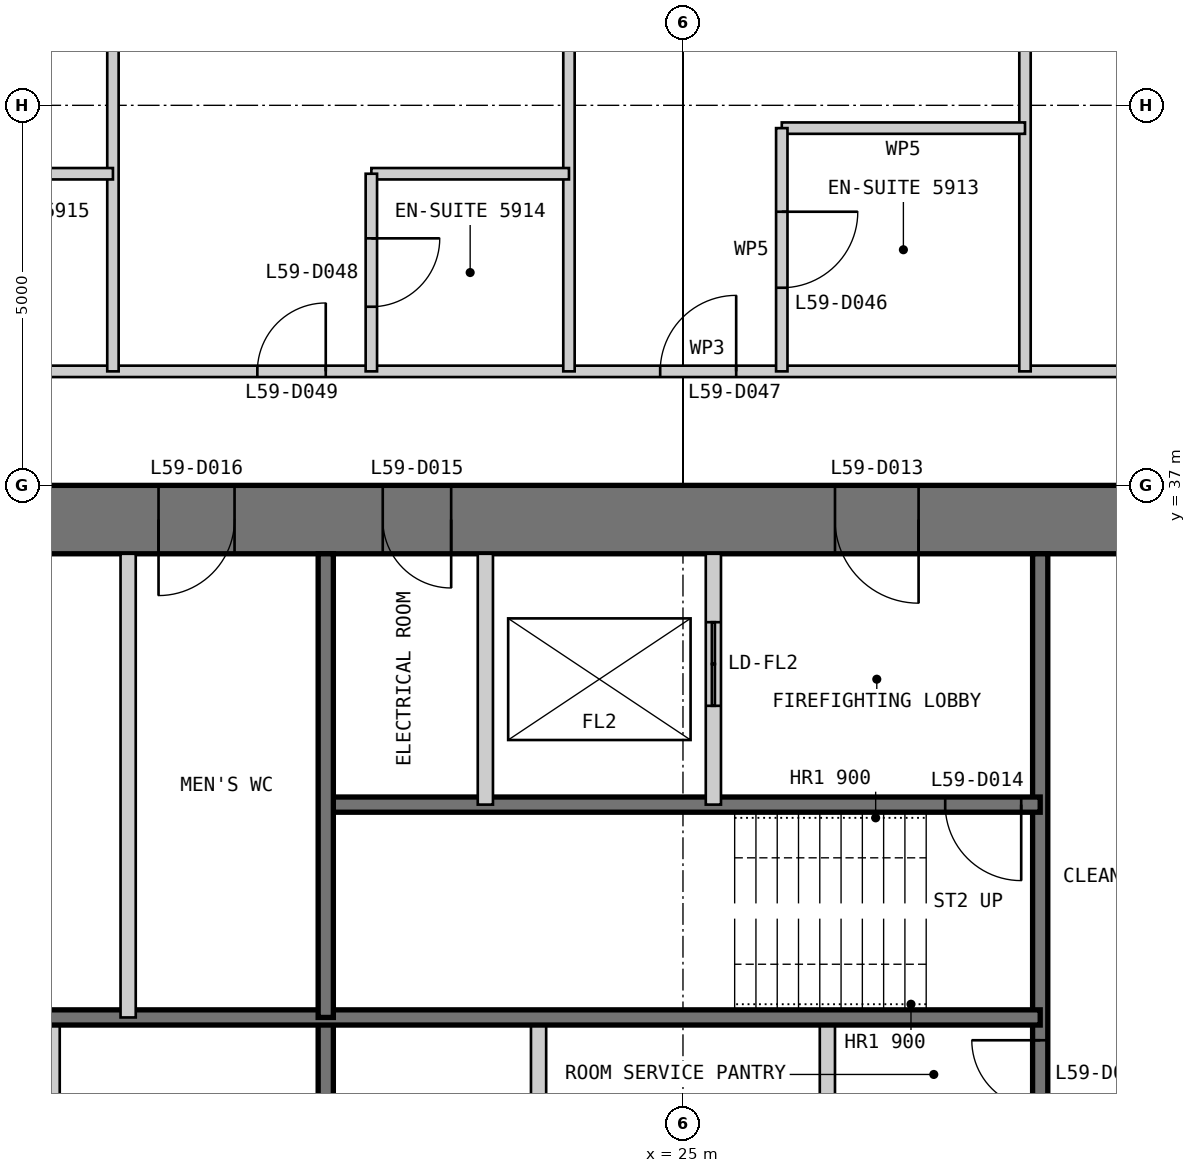
"""IFC4 building model, lengths in metres.
Left out: names, types, materials, properties, quantities, classifications, styles, units other than length and angle.
Written with IfcOpenShell. Run it as: python <this file> out.ifc"""

import sys

from ifc_helpers import new_model, si_unit, direction, frame, frame_2d, origin, place, context, subcontext, project, spatial, polyline, rectangle, outline, extrude, element, fill, save


model = new_model("IFC4")
c1 = context("Model", 3, precision=1e-05, world=origin(), true_north=direction((0.0, 1.0)))
c2 = subcontext(c1, "Body", "Model", "MODEL_VIEW")
j1 = project(units=[si_unit("LENGTHUNIT", "METRE"), si_unit("PLANEANGLEUNIT", "RADIAN")], contexts=[c1])
p1 = place(None, origin())
s1 = spatial("IfcSite", under=j1, at=p1, CompositionType="ELEMENT")
p2 = place(p1, origin())
s2 = spatial("IfcBuilding", under=s1, at=p2, CompositionType="ELEMENT")
p3 = place(p2, frame((0.0, 0.0, 252.6)))
s3 = spatial("IfcBuildingStorey", under=s2, at=p3, CompositionType="ELEMENT", Elevation=252.6)
p4 = place(p3, frame((37.0, 36.55, 0.0), z_axis=(0.0, 0.0, 1.0), x_axis=(-1.0, 0.0, 0.0)))
e1 = element("IfcWall", 1, at=p4, inside=s3, PredefinedType="SHEAR", context=c2, shape_type="SweptSolid", body=[
    extrude(outline(polyline([(0.0, -0.45), (24.0, -0.45), (23.1, 0.45), (0.9, 0.45), (0.0, -0.45)])), origin(), (0.0, 0.0, 1.0), 3.4),
])
p5 = place(p4, frame((4.9, 0.0, 0.0)))
e2 = element("IfcOpeningElement", 2, at=p5, cuts=e1, PredefinedType="OPENING", context=c2, shape_type="SweptSolid", body=[
    extrude(rectangle(XDim=1.0, YDim=2.2, at=frame_2d((0.5, 1.1))), frame((0.0, 0.46, 0.0), z_axis=(0.0, -1.0, 0.0), x_axis=(1.0, 0.0, 0.0)), (0.0, 0.0, 1.0), 0.92),
])
p6 = place(p4, frame((8.9, 0.0, 0.0)))
e3 = element("IfcOpeningElement", 3, at=p6, cuts=e1, PredefinedType="OPENING", context=c2, shape_type="SweptSolid", body=[
    extrude(rectangle(XDim=1.1, YDim=2.2, at=frame_2d((0.55, 1.1))), frame((0.0, 0.46, 0.0), z_axis=(0.0, -1.0, 0.0), x_axis=(1.0, 0.0, 0.0)), (0.0, 0.0, 1.0), 0.92),
])
p7 = place(p4, frame((15.05, 0.0, 0.0)))
e4 = element("IfcOpeningElement", 4, at=p7, cuts=e1, PredefinedType="OPENING", context=c2, shape_type="SweptSolid", body=[
    extrude(rectangle(XDim=0.9, YDim=2.2, at=frame_2d((0.45, 1.1))), frame((0.0, 0.46, 0.0), z_axis=(0.0, -1.0, 0.0), x_axis=(1.0, 0.0, 0.0)), (0.0, 0.0, 1.0), 0.92),
])
p8 = place(p4, frame((17.9, 0.0, 0.0)))
e5 = element("IfcOpeningElement", 5, at=p8, cuts=e1, PredefinedType="OPENING", context=c2, shape_type="SweptSolid", body=[
    extrude(rectangle(XDim=1.0, YDim=2.2, at=frame_2d((0.5, 1.1))), frame((0.0, 0.46, 0.0), z_axis=(0.0, -1.0, 0.0), x_axis=(1.0, 0.0, 0.0)), (0.0, 0.0, 1.0), 0.92),
])
p9 = place(p4, frame((21.4, 0.0, 0.0)))
e6 = element("IfcOpeningElement", 6, at=p9, cuts=e1, PredefinedType="OPENING", context=c2, shape_type="SweptSolid", body=[
    extrude(rectangle(XDim=1.0, YDim=2.2, at=frame_2d((0.5, 1.1))), frame((0.0, 0.46, 0.0), z_axis=(0.0, -1.0, 0.0), x_axis=(1.0, 0.0, 0.0)), (0.0, 0.0, 1.0), 0.92),
])
p10 = place(p3, frame((16.7, 13.9, 0.0), z_axis=(0.0, 0.0, 1.0), x_axis=(0.0, 1.0, 0.0)))
e7 = element("IfcWall", 7, at=p10, inside=s3, PredefinedType="PARTITIONING", context=c2, shape_type="SweptSolid", body=[
    extrude(rectangle(XDim=16.1, YDim=0.2, at=frame_2d((8.05, 0.0))), origin(), (0.0, 0.0, 1.0), 3.2),
])
p11 = place(p10, frame((13.4, 0.0, 0.0)))
e8 = element("IfcOpeningElement", 8, at=p11, cuts=e7, PredefinedType="OPENING", context=c2, shape_type="SweptSolid", body=[
    extrude(rectangle(XDim=0.9, YDim=2.2, at=frame_2d((0.45, 1.1))), frame((0.0, 0.11, 0.0), z_axis=(0.0, -1.0, 0.0), x_axis=(1.0, 0.0, 0.0)), (0.0, 0.0, 1.0), 0.22),
])
p12 = place(p3, frame((20.3, 13.9, 0.0), z_axis=(0.0, 0.0, 1.0), x_axis=(0.0, 1.0, 0.0)))
e9 = element("IfcWall", 9, at=p12, inside=s3, PredefinedType="SOLIDWALL", context=c2, shape_type="SweptSolid", body=[
    extrude(rectangle(XDim=16.1, YDim=0.2, at=frame_2d((8.05, 0.0))), origin(), (0.0, 0.0, 1.0), 3.2),
])
p13 = place(p12, frame((8.4, 0.0, 0.0)))
e10 = element("IfcOpeningElement", 10, at=p13, cuts=e9, PredefinedType="OPENING", context=c2, shape_type="SweptSolid", body=[
    extrude(rectangle(XDim=0.9, YDim=2.2, at=frame_2d((0.45, 1.1))), frame((0.0, 0.11, 0.0), z_axis=(0.0, -1.0, 0.0), x_axis=(1.0, 0.0, 0.0)), (0.0, 0.0, 1.0), 0.22),
])
p14 = place(p12, frame((13.4, 0.0, 0.0)))
e11 = element("IfcOpeningElement", 11, at=p14, cuts=e9, PredefinedType="OPENING", context=c2, shape_type="SweptSolid", body=[
    extrude(rectangle(XDim=0.9, YDim=2.2, at=frame_2d((0.45, 1.1))), frame((0.0, 0.11, 0.0), z_axis=(0.0, -1.0, 0.0), x_axis=(1.0, 0.0, 0.0)), (0.0, 0.0, 1.0), 0.22),
])
p15 = place(p3, frame((23.1, 20.0, 0.0), z_axis=(0.0, 0.0, 1.0), x_axis=(0.0, 1.0, 0.0)))
e12 = element("IfcWall", 12, at=p15, inside=s3, PredefinedType="PARTITIONING", context=c2, shape_type="SweptSolid", body=[
    extrude(rectangle(XDim=10.0, YDim=0.2, at=frame_2d((5.0, 0.0))), origin(), (0.0, 0.0, 1.0), 3.2),
])
p16 = place(p3, frame((29.7, 36.1, 0.0), z_axis=(0.0, 0.0, 1.0), x_axis=(0.0, -1.0, 0.0)))
e13 = element("IfcWall", 13, at=p16, inside=s3, PredefinedType="SOLIDWALL", context=c2, shape_type="SweptSolid", body=[
    extrude(rectangle(XDim=16.1, YDim=0.2, at=frame_2d((8.05, 0.0))), origin(), (0.0, 0.0, 1.0), 3.2),
])
p17 = place(p16, frame((6.4, 0.0, 0.0)))
e14 = element("IfcOpeningElement", 14, at=p17, cuts=e13, PredefinedType="OPENING", context=c2, shape_type="SweptSolid", body=[
    extrude(rectangle(XDim=0.9, YDim=2.2, at=frame_2d((0.45, 1.1))), frame((0.0, 0.11, 0.0), z_axis=(0.0, -1.0, 0.0), x_axis=(1.0, 0.0, 0.0)), (0.0, 0.0, 1.0), 0.22),
])
p18 = place(p16, frame((11.4, 0.0, 0.0)))
e15 = element("IfcOpeningElement", 15, at=p18, cuts=e13, PredefinedType="OPENING", context=c2, shape_type="SweptSolid", body=[
    extrude(rectangle(XDim=0.9, YDim=2.2, at=frame_2d((0.45, 1.1))), frame((0.0, 0.11, 0.0), z_axis=(0.0, -1.0, 0.0), x_axis=(1.0, 0.0, 0.0)), (0.0, 0.0, 1.0), 0.22),
])
p19 = place(p3, frame((26.9, 30.0, 0.0), z_axis=(0.0, 0.0, 1.0), x_axis=(0.0, -1.0, 0.0)))
e16 = element("IfcWall", 16, at=p19, inside=s3, PredefinedType="PARTITIONING", context=c2, shape_type="SweptSolid", body=[
    extrude(rectangle(XDim=10.0, YDim=0.2, at=frame_2d((5.0, 0.0))), origin(), (0.0, 0.0, 1.0), 3.2),
])
p20 = place(p3, frame((29.7, 32.8, 0.0), z_axis=(0.0, 0.0, 1.0), x_axis=(-1.0, 0.0, 0.0)))
e17 = element("IfcWall", 17, at=p20, inside=s3, PredefinedType="SOLIDWALL", context=c2, shape_type="SweptSolid", body=[
    extrude(rectangle(XDim=9.4, YDim=0.2, at=frame_2d((4.7, 0.0))), origin(), (0.0, 0.0, 1.0), 3.2),
])
p21 = place(p20, frame((0.25, 0.0, 0.0)))
e18 = element("IfcOpeningElement", 18, at=p21, cuts=e17, PredefinedType="OPENING", context=c2, shape_type="SweptSolid", body=[
    extrude(rectangle(XDim=1.0, YDim=2.2, at=frame_2d((0.5, 1.1))), frame((0.0, 0.11, 0.0), z_axis=(0.0, -1.0, 0.0), x_axis=(1.0, 0.0, 0.0)), (0.0, 0.0, 1.0), 0.22),
])
p22 = place(p3, frame((29.7, 30.0, 0.0), z_axis=(0.0, 0.0, 1.0), x_axis=(-1.0, 0.0, 0.0)))
e19 = element("IfcWall", 19, at=p22, inside=s3, PredefinedType="SOLIDWALL", context=c2, shape_type="SweptSolid", body=[
    extrude(rectangle(XDim=15.8, YDim=0.2, at=frame_2d((7.9, 0.0))), origin(), (0.0, 0.0, 1.0), 3.2),
])
p23 = place(p3, frame((25.4, 36.1, 0.0), z_axis=(0.0, 0.0, 1.0), x_axis=(0.0, -1.0, 0.0)))
e20 = element("IfcWall", 20, at=p23, inside=s3, PredefinedType="PARTITIONING", context=c2, shape_type="SweptSolid", body=[
    extrude(rectangle(XDim=3.3, YDim=0.2, at=frame_2d((1.65, 0.0))), origin(), (0.0, 0.0, 1.0), 3.2),
])
p24 = place(p23, frame((0.9, 0.0, 0.0)))
e21 = element("IfcOpeningElement", 21, at=p24, cuts=e20, PredefinedType="OPENING", context=c2, shape_type="SweptSolid", body=[
    extrude(rectangle(XDim=1.1, YDim=2.2, at=frame_2d((0.55, 1.1))), frame((0.0, 0.11, 0.0), z_axis=(0.0, -1.0, 0.0), x_axis=(1.0, 0.0, 0.0)), (0.0, 0.0, 1.0), 0.22),
])
p25 = place(p3, frame((22.4, 36.1, 0.0), z_axis=(0.0, 0.0, 1.0), x_axis=(0.0, -1.0, 0.0)))
e22 = element("IfcWall", 22, at=p25, inside=s3, PredefinedType="PARTITIONING", context=c2, shape_type="SweptSolid", body=[
    extrude(rectangle(XDim=3.3, YDim=0.2, at=frame_2d((1.65, 0.0))), origin(), (0.0, 0.0, 1.0), 3.2),
])
p26 = place(p3, frame((20.3, 36.1, 0.0), z_axis=(0.0, 0.0, 1.0), x_axis=(0.0, -1.0, 0.0)))
e23 = element("IfcWall", 23, at=p26, inside=s3, PredefinedType="SOLIDWALL", context=c2, shape_type="SweptSolid", body=[
    extrude(rectangle(XDim=6.1, YDim=0.2, at=frame_2d((3.05, 0.0))), origin(), (0.0, 0.0, 1.0), 3.2),
])
p27 = place(p3, frame((17.7, 36.1, 0.0), z_axis=(0.0, 0.0, 1.0), x_axis=(0.0, -1.0, 0.0)))
e24 = element("IfcWall", 24, at=p27, inside=s3, PredefinedType="PARTITIONING", context=c2, shape_type="SweptSolid", body=[
    extrude(rectangle(XDim=6.1, YDim=0.2, at=frame_2d((3.05, 0.0))), origin(), (0.0, 0.0, 1.0), 3.2),
])
p28 = place(p3, frame((38.5, 38.5, 0.0), z_axis=(0.0, 0.0, 1.0), x_axis=(-1.0, 0.0, 0.0)))
e25 = element("IfcWall", 25, at=p28, inside=s3, PredefinedType="PARTITIONING", context=c2, shape_type="SweptSolid", body=[
    extrude(rectangle(XDim=27.0, YDim=0.15, at=frame_2d((13.5, 0.0))), origin(), (0.0, 0.0, 1.0), 3.25),
])
p29 = place(p28, frame((1.85, 0.0, 0.0)))
e26 = element("IfcOpeningElement", 26, at=p29, cuts=e25, PredefinedType="OPENING", context=c2, shape_type="SweptSolid", body=[
    extrude(rectangle(XDim=0.9, YDim=2.1, at=frame_2d((0.45, 1.05))), frame((0.0, 0.085, 0.0), z_axis=(0.0, -1.0, 0.0), x_axis=(1.0, 0.0, 0.0)), (0.0, 0.0, 1.0), 0.17),
])
p30 = place(p28, frame((6.2, 0.0, 0.0)))
e27 = element("IfcOpeningElement", 27, at=p30, cuts=e25, PredefinedType="OPENING", context=c2, shape_type="SweptSolid", body=[
    extrude(rectangle(XDim=0.9, YDim=2.1, at=frame_2d((0.45, 1.05))), frame((0.0, 0.085, 0.0), z_axis=(0.0, -1.0, 0.0), x_axis=(1.0, 0.0, 0.0)), (0.0, 0.0, 1.0), 0.17),
])
p31 = place(p28, frame((12.8, 0.0, 0.0)))
e28 = element("IfcOpeningElement", 28, at=p31, cuts=e25, PredefinedType="OPENING", context=c2, shape_type="SweptSolid", body=[
    extrude(rectangle(XDim=1.0, YDim=2.1, at=frame_2d((0.5, 1.05))), frame((0.0, 0.085, 0.0), z_axis=(0.0, -1.0, 0.0), x_axis=(1.0, 0.0, 0.0)), (0.0, 0.0, 1.0), 0.17),
])
p32 = place(p28, frame((18.2, 0.0, 0.0)))
e29 = element("IfcOpeningElement", 29, at=p32, cuts=e25, PredefinedType="OPENING", context=c2, shape_type="SweptSolid", body=[
    extrude(rectangle(XDim=0.9, YDim=2.1, at=frame_2d((0.45, 1.05))), frame((0.0, 0.085, 0.0), z_axis=(0.0, -1.0, 0.0), x_axis=(1.0, 0.0, 0.0)), (0.0, 0.0, 1.0), 0.17),
])
p33 = place(p28, frame((24.2, 0.0, 0.0)))
e30 = element("IfcOpeningElement", 30, at=p33, cuts=e25, PredefinedType="OPENING", context=c2, shape_type="SweptSolid", body=[
    extrude(rectangle(XDim=0.9, YDim=2.1, at=frame_2d((0.45, 1.05))), frame((0.0, 0.085, 0.0), z_axis=(0.0, -1.0, 0.0), x_axis=(1.0, 0.0, 0.0)), (0.0, 0.0, 1.0), 0.17),
])
p34 = place(p3, frame((29.5, 49.85, 0.0), z_axis=(0.0, 0.0, 1.0), x_axis=(0.0, -1.0, 0.0)))
e31 = element("IfcWall", 31, at=p34, inside=s3, PredefinedType="PARTITIONING", context=c2, shape_type="SweptSolid", body=[
    extrude(rectangle(XDim=11.35, YDim=0.15, at=frame_2d((5.675, 0.0))), origin(), (0.0, 0.0, 1.0), 3.25),
])
p35 = place(p3, frame((29.5, 41.7, 0.0), z_axis=(0.0, 0.0, 1.0), x_axis=(-1.0, 0.0, 0.0)))
e32 = element("IfcWall", 32, at=p35, inside=s3, PredefinedType="PARTITIONING", context=c2, shape_type="SweptSolid", body=[
    extrude(rectangle(XDim=3.2, YDim=0.15, at=frame_2d((1.6, 0.0))), origin(), (0.0, 0.0, 1.0), 3.25),
])
p36 = place(p3, frame((26.3, 41.7, 0.0), z_axis=(0.0, 0.0, 1.0), x_axis=(0.0, -1.0, 0.0)))
e33 = element("IfcWall", 33, at=p36, inside=s3, PredefinedType="PARTITIONING", context=c2, shape_type="SweptSolid", body=[
    extrude(rectangle(XDim=3.2, YDim=0.15, at=frame_2d((1.6, 0.0))), origin(), (0.0, 0.0, 1.0), 3.25),
])
p37 = place(p36, frame((1.1, 0.0, 0.0)))
e34 = element("IfcOpeningElement", 34, at=p37, cuts=e33, PredefinedType="OPENING", context=c2, shape_type="SweptSolid", body=[
    extrude(rectangle(XDim=1.0, YDim=2.1, at=frame_2d((0.5, 1.05))), frame((0.0, 0.085, 0.0), z_axis=(0.0, -1.0, 0.0), x_axis=(1.0, 0.0, 0.0)), (0.0, 0.0, 1.0), 0.17),
])
p38 = place(p3, frame((23.5, 49.85, 0.0), z_axis=(0.0, 0.0, 1.0), x_axis=(0.0, -1.0, 0.0)))
e35 = element("IfcWall", 35, at=p38, inside=s3, PredefinedType="PARTITIONING", context=c2, shape_type="SweptSolid", body=[
    extrude(rectangle(XDim=11.35, YDim=0.15, at=frame_2d((5.675, 0.0))), origin(), (0.0, 0.0, 1.0), 3.25),
])
p39 = place(p3, frame((23.5, 41.1, 0.0), z_axis=(0.0, 0.0, 1.0), x_axis=(-1.0, 0.0, 0.0)))
e36 = element("IfcWall", 36, at=p39, inside=s3, PredefinedType="PARTITIONING", context=c2, shape_type="SweptSolid", body=[
    extrude(rectangle(XDim=2.6, YDim=0.15, at=frame_2d((1.3, 0.0))), origin(), (0.0, 0.0, 1.0), 3.25),
])
p40 = place(p3, frame((20.9, 41.1, 0.0), z_axis=(0.0, 0.0, 1.0), x_axis=(0.0, -1.0, 0.0)))
e37 = element("IfcWall", 37, at=p40, inside=s3, PredefinedType="PARTITIONING", context=c2, shape_type="SweptSolid", body=[
    extrude(rectangle(XDim=2.6, YDim=0.15, at=frame_2d((1.3, 0.0))), origin(), (0.0, 0.0, 1.0), 3.25),
])
p41 = place(p40, frame((0.85, 0.0, 0.0)))
e38 = element("IfcOpeningElement", 38, at=p41, cuts=e37, PredefinedType="OPENING", context=c2, shape_type="SweptSolid", body=[
    extrude(rectangle(XDim=0.9, YDim=2.1, at=frame_2d((0.45, 1.05))), frame((0.0, 0.085, 0.0), z_axis=(0.0, -1.0, 0.0), x_axis=(1.0, 0.0, 0.0)), (0.0, 0.0, 1.0), 0.17),
])
p42 = place(p3, frame((17.5, 49.85, 0.0), z_axis=(0.0, 0.0, 1.0), x_axis=(0.0, -1.0, 0.0)))
e39 = element("IfcWall", 39, at=p42, inside=s3, PredefinedType="PARTITIONING", context=c2, shape_type="SweptSolid", body=[
    extrude(rectangle(XDim=11.35, YDim=0.15, at=frame_2d((5.675, 0.0))), origin(), (0.0, 0.0, 1.0), 3.25),
])
p43 = place(p3, frame((17.5, 41.1, 0.0), z_axis=(0.0, 0.0, 1.0), x_axis=(-1.0, 0.0, 0.0)))
e40 = element("IfcWall", 40, at=p43, inside=s3, PredefinedType="PARTITIONING", context=c2, shape_type="SweptSolid", body=[
    extrude(rectangle(XDim=2.6, YDim=0.15, at=frame_2d((1.3, 0.0))), origin(), (0.0, 0.0, 1.0), 3.25),
])
p44 = place(p6, origin())
e41 = element("IfcDoor", 41, at=p44, inside=s3, OperationType="SINGLE_SWING_LEFT", PredefinedType="DOOR", context=c2, shape_type="SweptSolid", body=[
    extrude(rectangle(XDim=1.1, YDim=2.2, at=frame_2d((0.55, 1.1))), frame((0.0, 0.025, 0.0), z_axis=(0.0, -1.0, 0.0), x_axis=(1.0, 0.0, 0.0)), (0.0, 0.0, 1.0), 0.05),
    extrude(outline(polyline([(0.0, 0.0), (0.04, 0.0), (0.04, 2.16), (1.06, 2.16), (1.06, 0.0), (1.1, 0.0), (1.1, 2.2), (0.0, 2.2), (0.0, 0.0)])), frame((0.0, 0.3, 0.0), z_axis=(0.0, -1.0, 0.0), x_axis=(1.0, 0.0, 0.0)), (0.0, 0.0, 1.0), 0.6),
])
fill(e3, e41)
p45 = place(p21, origin())
e42 = element("IfcDoor", 42, at=p45, inside=s3, OperationType="SINGLE_SWING_LEFT", PredefinedType="DOOR", context=c2, shape_type="SweptSolid", body=[
    extrude(rectangle(XDim=1.0, YDim=2.2, at=frame_2d((0.5, 1.1))), frame((0.0, 0.025, 0.0), z_axis=(0.0, -1.0, 0.0), x_axis=(1.0, 0.0, 0.0)), (0.0, 0.0, 1.0), 0.05),
])
fill(e18, e42)
p46 = place(p7, origin())
e43 = element("IfcDoor", 43, at=p46, inside=s3, OperationType="SINGLE_SWING_LEFT", PredefinedType="DOOR", context=c2, shape_type="SweptSolid", body=[
    extrude(rectangle(XDim=0.9, YDim=2.2, at=frame_2d((0.45, 1.1))), frame((0.0, 0.025, 0.0), z_axis=(0.0, -1.0, 0.0), x_axis=(1.0, 0.0, 0.0)), (0.0, 0.0, 1.0), 0.05),
    extrude(outline(polyline([(0.0, 0.0), (0.04, 0.0), (0.04, 2.16), (0.86, 2.16), (0.86, 0.0), (0.9, 0.0), (0.9, 2.2), (0.0, 2.2), (0.0, 0.0)])), frame((0.0, 0.3, 0.0), z_axis=(0.0, -1.0, 0.0), x_axis=(1.0, 0.0, 0.0)), (0.0, 0.0, 1.0), 0.6),
])
fill(e4, e43)
p47 = place(p8, origin())
e44 = element("IfcDoor", 44, at=p47, inside=s3, OperationType="SINGLE_SWING_RIGHT", PredefinedType="DOOR", context=c2, shape_type="SweptSolid", body=[
    extrude(rectangle(XDim=1.0, YDim=2.2, at=frame_2d((0.5, 1.1))), frame((0.0, 0.025, 0.0), z_axis=(0.0, -1.0, 0.0), x_axis=(1.0, 0.0, 0.0)), (0.0, 0.0, 1.0), 0.05),
    extrude(outline(polyline([(0.0, 0.0), (0.04, 0.0), (0.04, 2.16), (0.96, 2.16), (0.96, 0.0), (1.0, 0.0), (1.0, 2.2), (0.0, 2.2), (0.0, 0.0)])), frame((0.0, 0.3, 0.0), z_axis=(0.0, -1.0, 0.0), x_axis=(1.0, 0.0, 0.0)), (0.0, 0.0, 1.0), 0.6),
])
fill(e5, e44)
p48 = place(p17, frame((0.9, 0.0, 0.0), z_axis=(0.0, 0.0, 1.0), x_axis=(-1.0, 0.0, 0.0)))
e45 = element("IfcDoor", 45, at=p48, inside=s3, OperationType="SINGLE_SWING_RIGHT", PredefinedType="DOOR", context=c2, shape_type="SweptSolid", body=[
    extrude(rectangle(XDim=0.9, YDim=2.2, at=frame_2d((0.45, 1.1))), frame((0.0, 0.025, 0.0), z_axis=(0.0, -1.0, 0.0), x_axis=(1.0, 0.0, 0.0)), (0.0, 0.0, 1.0), 0.05),
])
fill(e14, e45)
p49 = place(p37, origin())
e46 = element("IfcDoor", 46, at=p49, inside=s3, OperationType="SINGLE_SWING_LEFT", PredefinedType="DOOR", context=c2, shape_type="SweptSolid", body=[
    extrude(rectangle(XDim=1.0, YDim=2.1, at=frame_2d((0.5, 1.05))), frame((0.0, 0.025, 0.0), z_axis=(0.0, -1.0, 0.0), x_axis=(1.0, 0.0, 0.0)), (0.0, 0.0, 1.0), 0.05),
])
fill(e34, e46)
p50 = place(p31, frame((1.0, 0.0, 0.0), z_axis=(0.0, 0.0, 1.0), x_axis=(-1.0, 0.0, 0.0)))
e47 = element("IfcDoor", 47, at=p50, inside=s3, OperationType="SINGLE_SWING_RIGHT", PredefinedType="DOOR", context=c2, shape_type="SweptSolid", body=[
    extrude(rectangle(XDim=1.0, YDim=2.1, at=frame_2d((0.5, 1.05))), frame((0.0, 0.025, 0.0), z_axis=(0.0, -1.0, 0.0), x_axis=(1.0, 0.0, 0.0)), (0.0, 0.0, 1.0), 0.05),
])
fill(e28, e47)
p51 = place(p41, origin())
e48 = element("IfcDoor", 48, at=p51, inside=s3, OperationType="SINGLE_SWING_LEFT", PredefinedType="DOOR", context=c2, shape_type="SweptSolid", body=[
    extrude(rectangle(XDim=0.9, YDim=2.1, at=frame_2d((0.45, 1.05))), frame((0.0, 0.025, 0.0), z_axis=(0.0, -1.0, 0.0), x_axis=(1.0, 0.0, 0.0)), (0.0, 0.0, 1.0), 0.05),
])
fill(e38, e48)
p52 = place(p32, frame((0.9, 0.0, 0.0), z_axis=(0.0, 0.0, 1.0), x_axis=(-1.0, 0.0, 0.0)))
e49 = element("IfcDoor", 49, at=p52, inside=s3, OperationType="SINGLE_SWING_RIGHT", PredefinedType="DOOR", context=c2, shape_type="SweptSolid", body=[
    extrude(rectangle(XDim=0.9, YDim=2.1, at=frame_2d((0.45, 1.05))), frame((0.0, 0.025, 0.0), z_axis=(0.0, -1.0, 0.0), x_axis=(1.0, 0.0, 0.0)), (0.0, 0.0, 1.0), 0.05),
])
fill(e29, e49)
p53 = place(p24, origin())
e50 = element("IfcDoor", 50, at=p53, inside=s3, OperationType="DOUBLE_DOOR_SLIDING", PredefinedType="DOOR", context=c2, shape_type="SweptSolid", body=[
    extrude(rectangle(XDim=1.1, YDim=2.2, at=frame_2d((0.55, 1.1))), frame((0.0, 0.025, 0.0), z_axis=(0.0, -1.0, 0.0), x_axis=(1.0, 0.0, 0.0)), (0.0, 0.0, 1.0), 0.05),
])
fill(e21, e50)
save(model, sys.argv[1])
